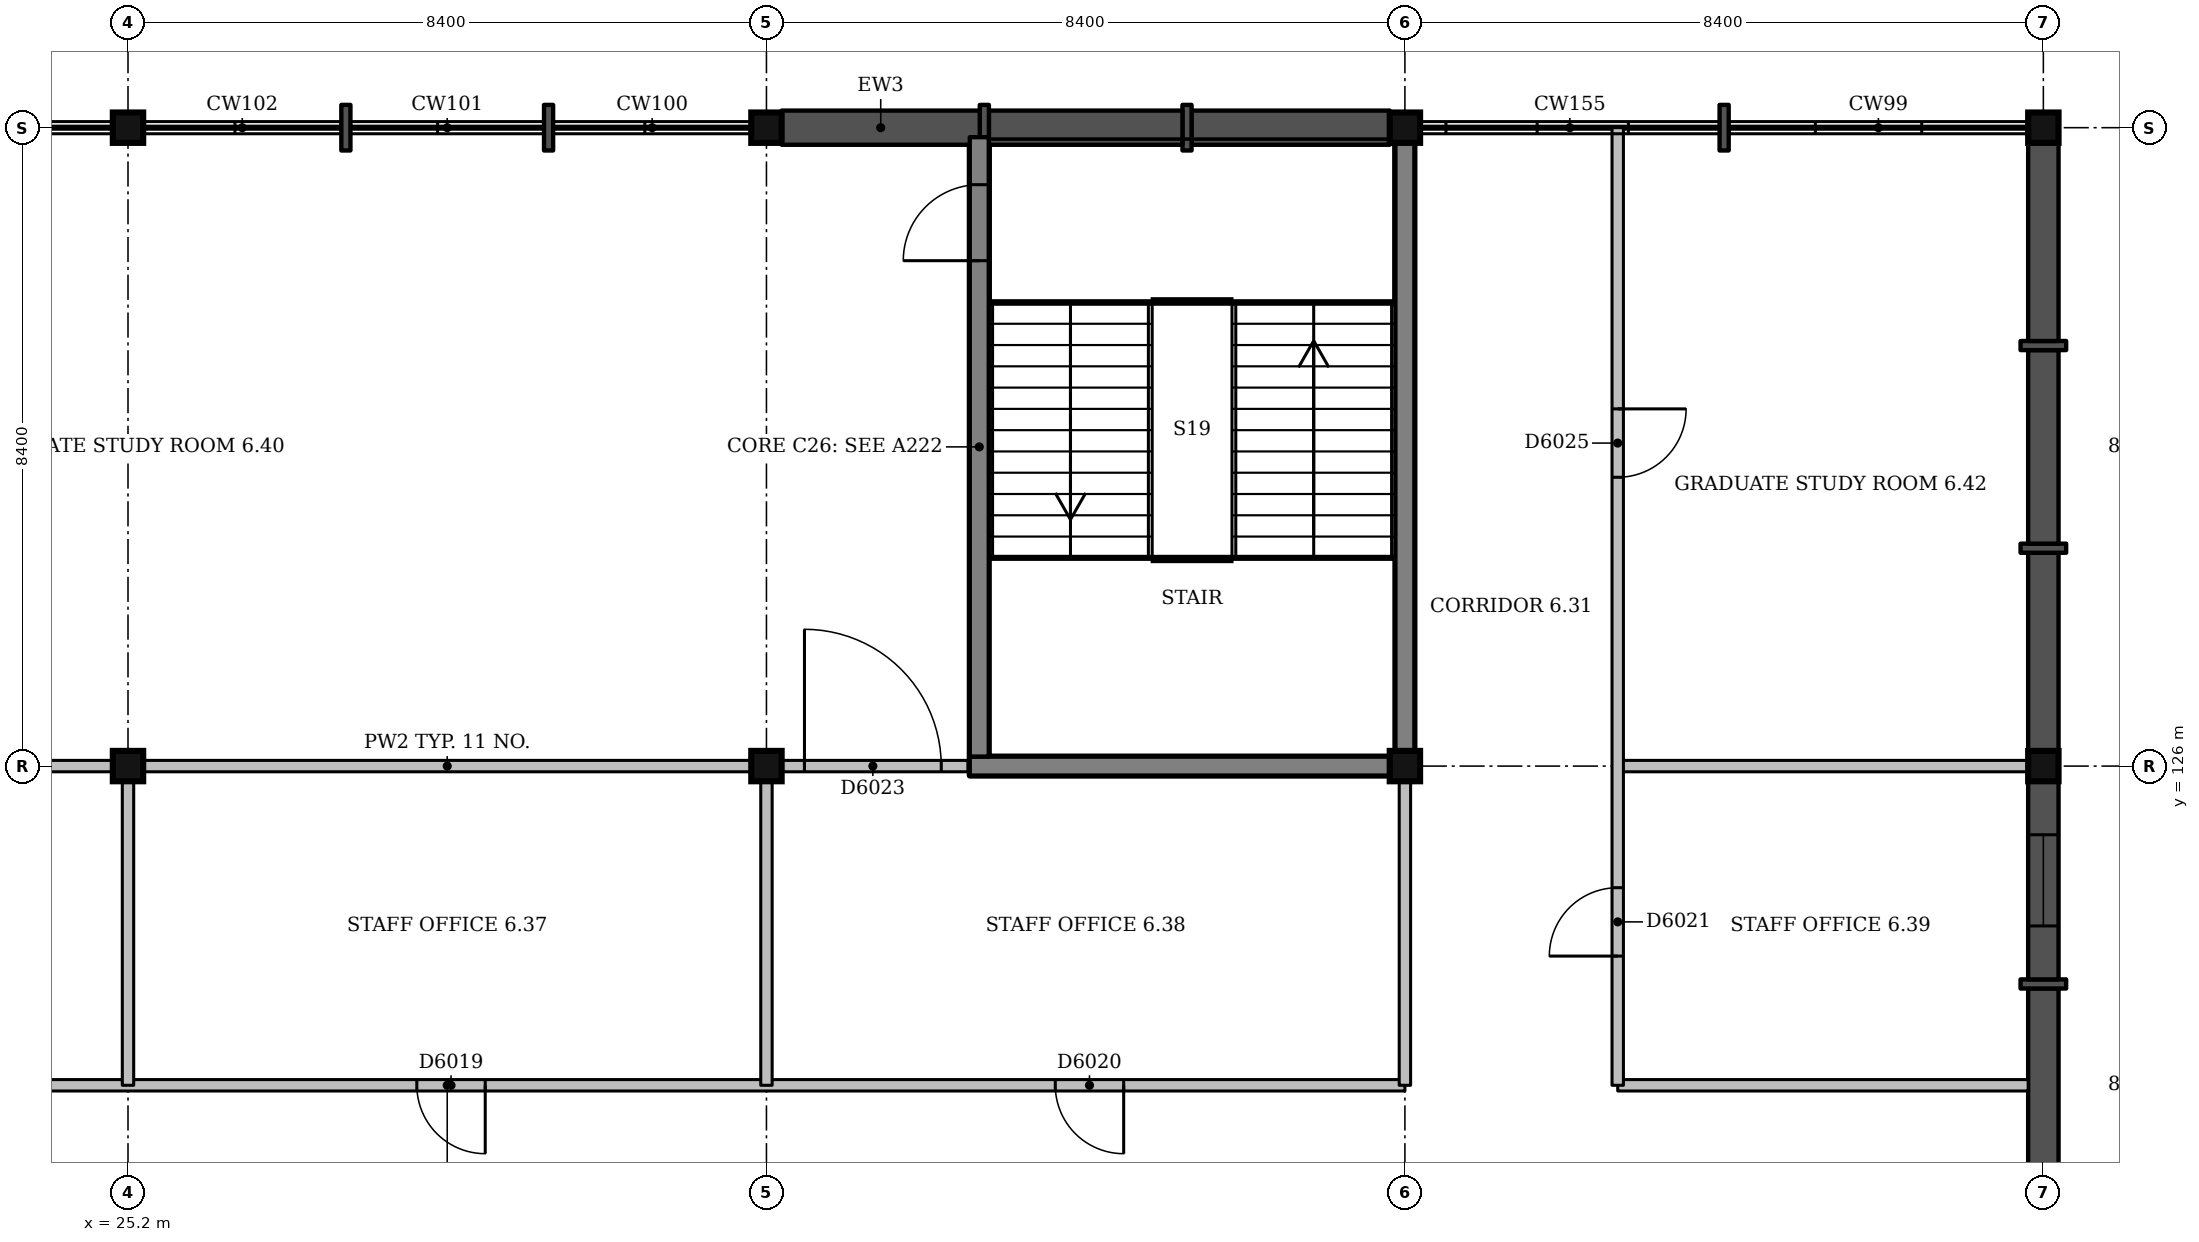
"""IFC4 building model, lengths in metres.
Left out: names, types, materials, properties, quantities, classifications, styles, units other than length and angle.
Written with IfcOpenShell. Run it as: python <this file> out.ifc"""

import sys

from ifc_helpers import new_model, si_unit, direction, frame, frame_2d, origin, origin_2d, place, context, subcontext, project, spatial, rectangle, extrude, element, fill, save


model = new_model("IFC4")
c1 = context("Model", 3, precision=1e-05, world=origin(), true_north=direction((0.0, 1.0)))
c2 = subcontext(c1, "Body", "Model", "MODEL_VIEW")
j1 = project(units=[si_unit("LENGTHUNIT", "METRE"), si_unit("PLANEANGLEUNIT", "RADIAN")], contexts=[c1])
p1 = place(None, origin())
s1 = spatial("IfcSite", under=j1, at=p1, CompositionType="ELEMENT")
p2 = place(p1, origin())
s2 = spatial("IfcBuilding", under=s1, at=p2, CompositionType="ELEMENT")
p3 = place(p2, frame((0.0, 0.0, 27.0)))
s3 = spatial("IfcBuildingStorey", under=s2, at=p3, CompositionType="ELEMENT", Elevation=27.0)
for number, where, z_axis, x_axis in (
    (1, (25.2, 126.0, 0.0), (0.0, 0.0, 1.0), (1.0, 0.0, 0.0)),
    (2, (25.2, 134.4, 0.0), (0.0, 0.0, 1.0), (1.0, 0.0, 0.0)),
    (3, (33.6, 126.0, 0.0), (0.0, 0.0, 1.0), (1.0, 0.0, 0.0)),
    (4, (33.6, 134.4, 0.0), (0.0, 0.0, 1.0), (1.0, 0.0, 0.0)),
    (5, (42.0, 126.0, 0.0), (0.0, 0.0, 1.0), (1.0, 0.0, 0.0)),
    (6, (42.0, 134.4, 0.0), (0.0, 0.0, 1.0), (1.0, 0.0, 0.0)),
    (7, (50.4, 126.0, 0.0), (0.0, 0.0, 1.0), (1.0, 0.0, 0.0)),
    (8, (50.4, 134.4, 0.0), (0.0, 0.0, 1.0), (1.0, 0.0, 0.0)),
):
    element("IfcColumn", number, at=place(p3, frame(where, z_axis=z_axis, x_axis=x_axis)), inside=s3, PredefinedType="COLUMN", context=c2, shape_type="SweptSolid", body=[
        extrude(rectangle(XDim=0.4, YDim=0.4, at=origin_2d()), origin(), (0.0, 0.0, 1.0), 4.5),
    ])
p4 = place(p3, frame((36.275, 126.0, 0.0), z_axis=(0.0, 0.0, 1.0), x_axis=(1.0, 0.0, 0.0)))
e9 = element("IfcWall", 9, at=p4, inside=s3, PredefinedType="SHEAR", context=c2, shape_type="SweptSolid", body=[
    extrude(rectangle(XDim=5.525, YDim=0.25, at=frame_2d((2.763, 0.0))), origin(), (0.0, 0.0, 1.0), 4.5),
])
p5 = place(p3, frame((36.4, 126.125, 0.0), z_axis=(0.0, 0.0, 1.0), x_axis=(0.0, 1.0, 0.0)))
e10 = element("IfcWall", 10, at=p5, inside=s3, PredefinedType="SHEAR", context=c2, shape_type="SweptSolid", body=[
    extrude(rectangle(XDim=8.15, YDim=0.25, at=frame_2d((4.075, 0.0))), origin(), (0.0, 0.0, 1.0), 4.5),
])
p6 = place(p5, frame((6.525, 0.0, 0.0)))
e11 = element("IfcOpeningElement", 11, at=p6, cuts=e10, PredefinedType="OPENING", context=c2, shape_type="SweptSolid", body=[
    extrude(rectangle(XDim=1.0, YDim=2.1, at=frame_2d((0.5, 1.05))), frame((0.0, 0.135, 0.0), z_axis=(0.0, -1.0, 0.0), x_axis=(1.0, 0.0, 0.0)), (0.0, 0.0, 1.0), 0.27),
])
p7 = place(p3, frame((42.0, 126.2, 0.0), z_axis=(0.0, 0.0, 1.0), x_axis=(0.0, 1.0, 0.0)))
e12 = element("IfcWall", 12, at=p7, inside=s3, PredefinedType="SHEAR", context=c2, shape_type="SweptSolid", body=[
    extrude(rectangle(XDim=8.0, YDim=0.25, at=frame_2d((4.0, 0.0))), origin(), (0.0, 0.0, 1.0), 4.5),
])
p8 = place(p3, frame((50.4, 120.527, 0.0), z_axis=(0.0, 0.0, 1.0), x_axis=(0.0, 1.0, 0.0)))
e13 = element("IfcWall", 13, at=p8, inside=s3, PredefinedType="SOLIDWALL", context=c2, shape_type="SweptSolid", body=[
    extrude(rectangle(XDim=2.547, YDim=0.4, at=frame_2d((1.273, 0.0))), origin(), (0.0, 0.0, 1.0), 3.6),
])
p9 = place(p3, frame((50.4, 123.073, 0.0), z_axis=(0.0, 0.0, 1.0), x_axis=(0.0, 1.0, 0.0)))
e14 = element("IfcWall", 14, at=p9, inside=s3, PredefinedType="SOLIDWALL", context=c2, shape_type="SweptSolid", body=[
    extrude(rectangle(XDim=0.12, YDim=0.6, at=frame_2d((0.06, 0.0))), origin(), (0.0, 0.0, 1.0), 3.6),
])
p10 = place(p3, frame((50.4, 123.193, 0.0), z_axis=(0.0, 0.0, 1.0), x_axis=(0.0, 1.0, 0.0)))
e15 = element("IfcWall", 15, at=p10, inside=s3, PredefinedType="SOLIDWALL", context=c2, shape_type="SweptSolid", body=[
    extrude(rectangle(XDim=2.607, YDim=0.4, at=frame_2d((1.303, 0.0))), origin(), (0.0, 0.0, 1.0), 3.6),
])
p11 = place(p10, frame((0.703, 0.0, 0.9)))
e16 = element("IfcOpeningElement", 16, at=p11, cuts=e15, PredefinedType="OPENING", context=c2, shape_type="SweptSolid", body=[
    extrude(rectangle(XDim=1.2, YDim=2.1, at=frame_2d((0.6, 1.05))), frame((0.0, 0.21, 0.0), z_axis=(0.0, -1.0, 0.0), x_axis=(1.0, 0.0, 0.0)), (0.0, 0.0, 1.0), 0.42),
])
p12 = place(p3, frame((50.4, 126.2, 0.0), z_axis=(0.0, 0.0, 1.0), x_axis=(0.0, 1.0, 0.0)))
e17 = element("IfcWall", 17, at=p12, inside=s3, PredefinedType="SOLIDWALL", context=c2, shape_type="SweptSolid", body=[
    extrude(rectangle(XDim=2.607, YDim=0.4, at=frame_2d((1.303, 0.0))), origin(), (0.0, 0.0, 1.0), 3.6),
])
p13 = place(p3, frame((50.4, 128.807, 0.0), z_axis=(0.0, 0.0, 1.0), x_axis=(0.0, 1.0, 0.0)))
e18 = element("IfcWall", 18, at=p13, inside=s3, PredefinedType="SOLIDWALL", context=c2, shape_type="SweptSolid", body=[
    extrude(rectangle(XDim=0.12, YDim=0.6, at=frame_2d((0.06, 0.0))), origin(), (0.0, 0.0, 1.0), 3.6),
])
p14 = place(p3, frame((50.4, 128.927, 0.0), z_axis=(0.0, 0.0, 1.0), x_axis=(0.0, 1.0, 0.0)))
e19 = element("IfcWall", 19, at=p14, inside=s3, PredefinedType="SOLIDWALL", context=c2, shape_type="SweptSolid", body=[
    extrude(rectangle(XDim=2.547, YDim=0.4, at=frame_2d((1.273, 0.0))), origin(), (0.0, 0.0, 1.0), 3.6),
])
p15 = place(p3, frame((50.4, 131.473, 0.0), z_axis=(0.0, 0.0, 1.0), x_axis=(0.0, 1.0, 0.0)))
e20 = element("IfcWall", 20, at=p15, inside=s3, PredefinedType="SOLIDWALL", context=c2, shape_type="SweptSolid", body=[
    extrude(rectangle(XDim=0.12, YDim=0.6, at=frame_2d((0.06, 0.0))), origin(), (0.0, 0.0, 1.0), 3.6),
])
p16 = place(p3, frame((50.4, 131.593, 0.0), z_axis=(0.0, 0.0, 1.0), x_axis=(0.0, 1.0, 0.0)))
e21 = element("IfcWall", 21, at=p16, inside=s3, PredefinedType="SOLIDWALL", context=c2, shape_type="SweptSolid", body=[
    extrude(rectangle(XDim=2.607, YDim=0.4, at=frame_2d((1.303, 0.0))), origin(), (0.0, 0.0, 1.0), 3.6),
])
p17 = place(p3, frame((46.26, 134.4, 0.0), z_axis=(0.0, 0.0, 1.0), x_axis=(-1.0, 0.0, 0.0)))
e22 = element("IfcWall", 22, at=p17, inside=s3, PredefinedType="SOLIDWALL", context=c2, shape_type="SweptSolid", body=[
    extrude(rectangle(XDim=0.12, YDim=0.6, at=frame_2d((0.06, 0.0))), origin(), (0.0, 0.0, 1.0), 3.6),
])
p18 = place(p3, frame((41.8, 134.4, 0.0), z_axis=(0.0, 0.0, 1.0), x_axis=(-1.0, 0.0, 0.0)))
e23 = element("IfcWall", 23, at=p18, inside=s3, PredefinedType="SOLIDWALL", context=c2, shape_type="SweptSolid", body=[
    extrude(rectangle(XDim=2.607, YDim=0.45, at=frame_2d((1.303, 0.0))), origin(), (0.0, 0.0, 1.0), 3.35),
])
p19 = place(p3, frame((39.193, 134.4, 0.0), z_axis=(0.0, 0.0, 1.0), x_axis=(-1.0, 0.0, 0.0)))
e24 = element("IfcWall", 24, at=p19, inside=s3, PredefinedType="SOLIDWALL", context=c2, shape_type="SweptSolid", body=[
    extrude(rectangle(XDim=0.12, YDim=0.6, at=frame_2d((0.06, 0.0))), origin(), (0.0, 0.0, 1.0), 3.35),
])
p20 = place(p3, frame((39.073, 134.4, 0.0), z_axis=(0.0, 0.0, 1.0), x_axis=(-1.0, 0.0, 0.0)))
e25 = element("IfcWall", 25, at=p20, inside=s3, PredefinedType="SOLIDWALL", context=c2, shape_type="SweptSolid", body=[
    extrude(rectangle(XDim=2.547, YDim=0.45, at=frame_2d((1.273, 0.0))), origin(), (0.0, 0.0, 1.0), 3.35),
])
p21 = place(p3, frame((36.527, 134.4, 0.0), z_axis=(0.0, 0.0, 1.0), x_axis=(-1.0, 0.0, 0.0)))
e26 = element("IfcWall", 26, at=p21, inside=s3, PredefinedType="SOLIDWALL", context=c2, shape_type="SweptSolid", body=[
    extrude(rectangle(XDim=0.12, YDim=0.6, at=frame_2d((0.06, 0.0))), origin(), (0.0, 0.0, 1.0), 3.35),
])
p22 = place(p3, frame((36.407, 134.4, 0.0), z_axis=(0.0, 0.0, 1.0), x_axis=(-1.0, 0.0, 0.0)))
e27 = element("IfcWall", 27, at=p22, inside=s3, PredefinedType="SOLIDWALL", context=c2, shape_type="SweptSolid", body=[
    extrude(rectangle(XDim=2.607, YDim=0.45, at=frame_2d((1.303, 0.0))), origin(), (0.0, 0.0, 1.0), 3.35),
])
p23 = place(p3, frame((30.793, 134.4, 0.0), z_axis=(0.0, 0.0, 1.0), x_axis=(-1.0, 0.0, 0.0)))
e28 = element("IfcWall", 28, at=p23, inside=s3, PredefinedType="SOLIDWALL", context=c2, shape_type="SweptSolid", body=[
    extrude(rectangle(XDim=0.12, YDim=0.6, at=frame_2d((0.06, 0.0))), origin(), (0.0, 0.0, 1.0), 3.35),
])
p24 = place(p3, frame((28.127, 134.4, 0.0), z_axis=(0.0, 0.0, 1.0), x_axis=(-1.0, 0.0, 0.0)))
e29 = element("IfcWall", 29, at=p24, inside=s3, PredefinedType="SOLIDWALL", context=c2, shape_type="SweptSolid", body=[
    extrude(rectangle(XDim=0.12, YDim=0.6, at=frame_2d((0.06, 0.0))), origin(), (0.0, 0.0, 1.0), 3.35),
])
p25 = place(p3, frame((16.8, 121.8, 0.0), z_axis=(0.0, 0.0, 1.0), x_axis=(1.0, 0.0, 0.0)))
e30 = element("IfcWall", 30, at=p25, inside=s3, PredefinedType="PARTITIONING", context=c2, shape_type="SweptSolid", body=[
    extrude(rectangle(XDim=25.2, YDim=0.15, at=frame_2d((12.6, 0.0))), origin(), (0.0, 0.0, 1.0), 3.35),
])
p26 = place(p25, frame((3.8, 0.0, 0.0)))
e31 = element("IfcOpeningElement", 31, at=p26, cuts=e30, PredefinedType="OPENING", context=c2, shape_type="SweptSolid", body=[
    extrude(rectangle(XDim=0.9, YDim=2.1, at=frame_2d((0.45, 1.05))), frame((0.0, 0.085, 0.0), z_axis=(0.0, -1.0, 0.0), x_axis=(1.0, 0.0, 0.0)), (0.0, 0.0, 1.0), 0.17),
])
p27 = place(p25, frame((12.2, 0.0, 0.0)))
e32 = element("IfcOpeningElement", 32, at=p27, cuts=e30, PredefinedType="OPENING", context=c2, shape_type="SweptSolid", body=[
    extrude(rectangle(XDim=0.9, YDim=2.1, at=frame_2d((0.45, 1.05))), frame((0.0, 0.085, 0.0), z_axis=(0.0, -1.0, 0.0), x_axis=(1.0, 0.0, 0.0)), (0.0, 0.0, 1.0), 0.17),
])
p28 = place(p25, frame((20.6, 0.0, 0.0)))
e33 = element("IfcOpeningElement", 33, at=p28, cuts=e30, PredefinedType="OPENING", context=c2, shape_type="SweptSolid", body=[
    extrude(rectangle(XDim=0.9, YDim=2.1, at=frame_2d((0.45, 1.05))), frame((0.0, 0.085, 0.0), z_axis=(0.0, -1.0, 0.0), x_axis=(1.0, 0.0, 0.0)), (0.0, 0.0, 1.0), 0.17),
])
p29 = place(p3, frame((44.8, 121.8, 0.0), z_axis=(0.0, 0.0, 1.0), x_axis=(1.0, 0.0, 0.0)))
e34 = element("IfcWall", 34, at=p29, inside=s3, PredefinedType="PARTITIONING", context=c2, shape_type="SweptSolid", body=[
    extrude(rectangle(XDim=5.4, YDim=0.15, at=frame_2d((2.7, 0.0))), origin(), (0.0, 0.0, 1.0), 4.15),
])
p30 = place(p3, frame((17.0, 126.0, 0.0), z_axis=(0.0, 0.0, 1.0), x_axis=(1.0, 0.0, 0.0)))
e35 = element("IfcWall", 35, at=p30, inside=s3, PredefinedType="PARTITIONING", context=c2, shape_type="SweptSolid", body=[
    extrude(rectangle(XDim=8.0, YDim=0.15, at=frame_2d((4.0, 0.0))), origin(), (0.0, 0.0, 1.0), 3.4),
])
p31 = place(p30, frame((3.1, 0.0, 0.0)))
e36 = element("IfcOpeningElement", 36, at=p31, cuts=e35, PredefinedType="OPENING", context=c2, shape_type="SweptSolid", body=[
    extrude(rectangle(XDim=1.8, YDim=2.1, at=frame_2d((0.9, 1.05))), frame((0.0, 0.085, 0.0), z_axis=(0.0, -1.0, 0.0), x_axis=(1.0, 0.0, 0.0)), (0.0, 0.0, 1.0), 0.17),
])
p32 = place(p3, frame((25.4, 126.0, 0.0), z_axis=(0.0, 0.0, 1.0), x_axis=(1.0, 0.0, 0.0)))
e37 = element("IfcWall", 37, at=p32, inside=s3, PredefinedType="PARTITIONING", context=c2, shape_type="SweptSolid", body=[
    extrude(rectangle(XDim=8.0, YDim=0.15, at=frame_2d((4.0, 0.0))), origin(), (0.0, 0.0, 1.0), 3.4),
])
p33 = place(p3, frame((33.8, 126.0, 0.0), z_axis=(0.0, 0.0, 1.0), x_axis=(1.0, 0.0, 0.0)))
e38 = element("IfcWall", 38, at=p33, inside=s3, PredefinedType="PARTITIONING", context=c2, shape_type="SweptSolid", body=[
    extrude(rectangle(XDim=2.45, YDim=0.15, at=frame_2d((1.225, 0.0))), origin(), (0.0, 0.0, 1.0), 3.4),
])
p34 = place(p33, frame((0.3, 0.0, 0.0)))
e39 = element("IfcOpeningElement", 39, at=p34, cuts=e38, PredefinedType="OPENING", context=c2, shape_type="SweptSolid", body=[
    extrude(rectangle(XDim=1.8, YDim=2.1, at=frame_2d((0.9, 1.05))), frame((0.0, 0.085, 0.0), z_axis=(0.0, -1.0, 0.0), x_axis=(1.0, 0.0, 0.0)), (0.0, 0.0, 1.0), 0.17),
])
p35 = place(p3, frame((44.8, 126.0, 0.0), z_axis=(0.0, 0.0, 1.0), x_axis=(1.0, 0.0, 0.0)))
e40 = element("IfcWall", 40, at=p35, inside=s3, PredefinedType="PARTITIONING", context=c2, shape_type="SweptSolid", body=[
    extrude(rectangle(XDim=5.4, YDim=0.15, at=frame_2d((2.7, 0.0))), origin(), (0.0, 0.0, 1.0), 3.6),
])
for number, where, z_axis, x_axis in (
    (41, (25.2, 121.8, 0.0), (0.0, 0.0, 1.0), (0.0, 1.0, 0.0)),
    (42, (33.6, 121.8, 0.0), (0.0, 0.0, 1.0), (0.0, 1.0, 0.0)),
):
    element("IfcWall", number, at=place(p3, frame(where, z_axis=z_axis, x_axis=x_axis)), inside=s3, PredefinedType="PARTITIONING", context=c2, shape_type="SweptSolid", body=[
        extrude(rectangle(XDim=4.0, YDim=0.15, at=frame_2d((2.0, 0.0))), origin(), (0.0, 0.0, 1.0), 3.4),
    ])
p36 = place(p3, frame((42.0, 121.8, 0.0), z_axis=(0.0, 0.0, 1.0), x_axis=(0.0, 1.0, 0.0)))
e43 = element("IfcWall", 43, at=p36, inside=s3, PredefinedType="PARTITIONING", context=c2, shape_type="SweptSolid", body=[
    extrude(rectangle(XDim=4.0, YDim=0.15, at=frame_2d((2.0, 0.0))), origin(), (0.0, 0.0, 1.0), 3.35),
])
p37 = place(p3, frame((44.8, 121.8, 0.0), z_axis=(0.0, 0.0, 1.0), x_axis=(0.0, 1.0, 0.0)))
e44 = element("IfcWall", 44, at=p37, inside=s3, PredefinedType="PARTITIONING", context=c2, shape_type="SweptSolid", body=[
    extrude(rectangle(XDim=12.6, YDim=0.15, at=frame_2d((6.3, 0.0))), origin(), (0.0, 0.0, 1.0), 2.37),
])
p38 = place(p37, frame((1.7, 0.0, 0.0)))
e45 = element("IfcOpeningElement", 45, at=p38, cuts=e44, PredefinedType="OPENING", context=c2, shape_type="SweptSolid", body=[
    extrude(rectangle(XDim=0.9, YDim=2.1, at=frame_2d((0.45, 1.05))), frame((0.0, 0.085, 0.0), z_axis=(0.0, -1.0, 0.0), x_axis=(1.0, 0.0, 0.0)), (0.0, 0.0, 1.0), 0.17),
])
p39 = place(p37, frame((8.0, 0.0, 0.0)))
e46 = element("IfcOpeningElement", 46, at=p39, cuts=e44, PredefinedType="OPENING", context=c2, shape_type="SweptSolid", body=[
    extrude(rectangle(XDim=0.9, YDim=2.1, at=frame_2d((0.45, 1.05))), frame((0.0, 0.085, 0.0), z_axis=(0.0, -1.0, 0.0), x_axis=(1.0, 0.0, 0.0)), (0.0, 0.0, 1.0), 0.17),
])
p40 = place(p11, origin())
e47 = element("IfcWindow", 47, at=p40, inside=s3, PartitioningType="SINGLE_PANEL", PredefinedType="WINDOW", context=c2, shape_type="SweptSolid", body=[
    extrude(rectangle(XDim=1.2, YDim=2.1, at=frame_2d((0.6, 1.05))), frame((0.0, 0.16, 0.0), z_axis=(0.0, -1.0, 0.0), x_axis=(1.0, 0.0, 0.0)), (0.0, 0.0, 1.0), 0.06),
])
fill(e16, e47)
p41 = place(p27, origin())
e48 = element("IfcDoor", 48, at=p41, inside=s3, OperationType="SINGLE_SWING_RIGHT", PredefinedType="DOOR", context=c2, shape_type="SweptSolid", body=[
    extrude(rectangle(XDim=0.9, YDim=2.1, at=frame_2d((0.45, 1.05))), frame((0.0, 0.025, 0.0), z_axis=(0.0, -1.0, 0.0), x_axis=(1.0, 0.0, 0.0)), (0.0, 0.0, 1.0), 0.05),
])
fill(e32, e48)
p42 = place(p28, origin())
e49 = element("IfcDoor", 49, at=p42, inside=s3, OperationType="SINGLE_SWING_RIGHT", PredefinedType="DOOR", context=c2, shape_type="SweptSolid", body=[
    extrude(rectangle(XDim=0.9, YDim=2.1, at=frame_2d((0.45, 1.05))), frame((0.0, 0.025, 0.0), z_axis=(0.0, -1.0, 0.0), x_axis=(1.0, 0.0, 0.0)), (0.0, 0.0, 1.0), 0.05),
])
fill(e33, e49)
p43 = place(p38, origin())
e50 = element("IfcDoor", 50, at=p43, inside=s3, OperationType="SINGLE_SWING_LEFT", PredefinedType="DOOR", context=c2, shape_type="SweptSolid", body=[
    extrude(rectangle(XDim=0.9, YDim=2.1, at=frame_2d((0.45, 1.05))), frame((0.0, 0.025, 0.0), z_axis=(0.0, -1.0, 0.0), x_axis=(1.0, 0.0, 0.0)), (0.0, 0.0, 1.0), 0.05),
])
fill(e45, e50)
p44 = place(p34, origin())
e51 = element("IfcDoor", 51, at=p44, inside=s3, OperationType="DOUBLE_DOOR_SINGLE_SWING", PredefinedType="DOOR", context=c2, shape_type="SweptSolid", body=[
    extrude(rectangle(XDim=1.8, YDim=2.1, at=frame_2d((0.9, 1.05))), frame((0.0, 0.025, 0.0), z_axis=(0.0, -1.0, 0.0), x_axis=(1.0, 0.0, 0.0)), (0.0, 0.0, 1.0), 0.05),
])
fill(e39, e51)
p45 = place(p39, origin())
e52 = element("IfcDoor", 52, at=p45, inside=s3, OperationType="SINGLE_SWING_RIGHT", PredefinedType="DOOR", context=c2, shape_type="SweptSolid", body=[
    extrude(rectangle(XDim=0.9, YDim=2.1, at=frame_2d((0.45, 1.05))), frame((0.0, 0.025, 0.0), z_axis=(0.0, -1.0, 0.0), x_axis=(1.0, 0.0, 0.0)), (0.0, 0.0, 1.0), 0.05),
])
fill(e46, e52)
p46 = place(p6, origin())
e53 = element("IfcDoor", 53, at=p46, inside=s3, OperationType="SINGLE_SWING_LEFT", PredefinedType="DOOR", context=c2, shape_type="SweptSolid", body=[
    extrude(rectangle(XDim=1.0, YDim=2.1, at=frame_2d((0.5, 1.05))), frame((0.0, 0.025, 0.0), z_axis=(0.0, -1.0, 0.0), x_axis=(1.0, 0.0, 0.0)), (0.0, 0.0, 1.0), 0.05),
])
fill(e11, e53)
save(model, sys.argv[1])
